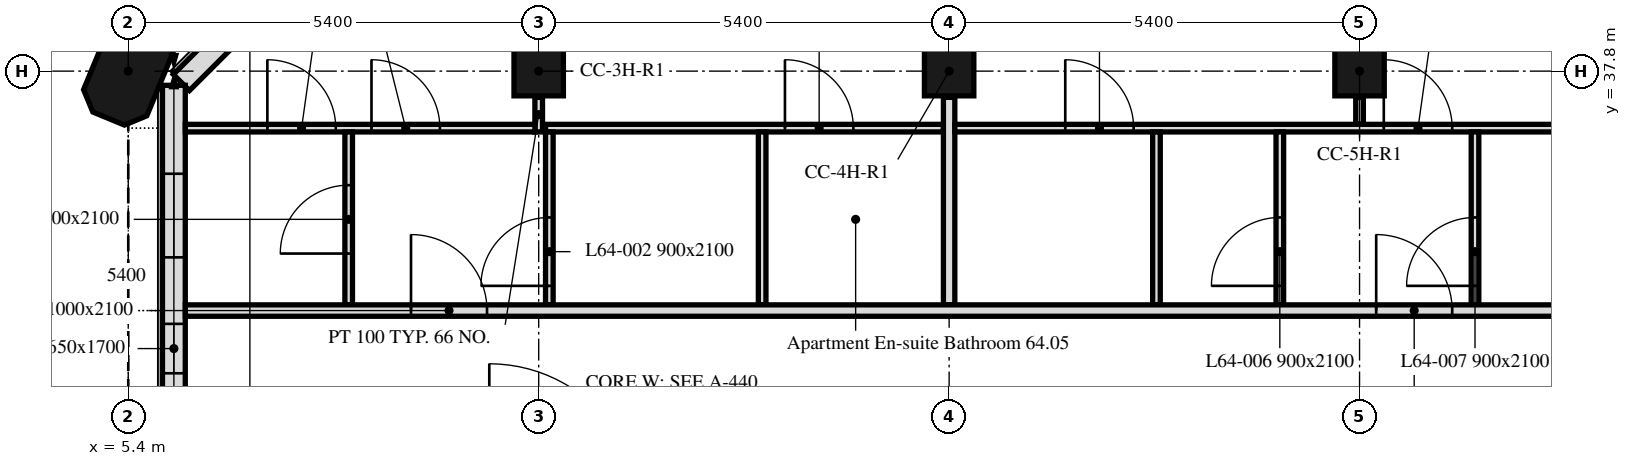
"""IFC4 building model, lengths in metres.
Left out: names, types, materials, properties, quantities, classifications, styles, units other than length and angle.
Written with IfcOpenShell. Run it as: python <this file> out.ifc"""

import sys

from ifc_helpers import new_model, si_unit, direction, frame, frame_2d, origin, origin_2d, place, context, subcontext, project, spatial, polyline, rectangle, outline, extrude, element, fill, save


model = new_model("IFC4")
c1 = context("Model", 3, precision=1e-05, world=origin(), true_north=direction((0.0, 1.0)))
c2 = subcontext(c1, "Body", "Model", "MODEL_VIEW")
j1 = project(units=[si_unit("LENGTHUNIT", "METRE"), si_unit("PLANEANGLEUNIT", "RADIAN")], contexts=[c1])
p1 = place(None, origin())
s1 = spatial("IfcSite", under=j1, at=p1, CompositionType="ELEMENT")
p2 = place(p1, origin())
s2 = spatial("IfcBuilding", under=s1, at=p2, CompositionType="ELEMENT")
p3 = place(p2, frame((0.0, 0.0, 265.3)))
s3 = spatial("IfcBuildingStorey", under=s2, at=p3, CompositionType="ELEMENT", Elevation=265.3)
p4 = place(p3, frame((5.4, 37.8, 0.0), z_axis=(0.0, 0.0, 1.0), x_axis=(0.382683432365, 0.923879532511, 0.0)))
e1 = element("IfcColumn", 1, at=p4, inside=s3, PredefinedType="COLUMN", context=c2, shape_type="SweptSolid", body=[
    extrude(outline(polyline([(-0.45, -0.45), (0.45, -0.45), (0.675, -0.225), (0.675, 0.225), (0.45, 0.45), (-0.45, 0.45), (-0.675, 0.225), (-0.675, -0.225), (-0.45, -0.45)])), origin(), (0.0, 0.0, 1.0), 3.0),
])
for number, where, z_axis, x_axis in (
    (2, (10.8, 37.8, 0.0), (0.0, 0.0, 1.0), (1.0, 0.0, 0.0)),
    (3, (16.2, 37.8, 0.0), (0.0, 0.0, 1.0), (1.0, 0.0, 0.0)),
    (4, (21.6, 37.8, 0.0), (0.0, 0.0, 1.0), (1.0, 0.0, 0.0)),
):
    element("IfcColumn", number, at=place(p3, frame(where, z_axis=z_axis, x_axis=x_axis)), inside=s3, PredefinedType="COLUMN", context=c2, shape_type="SweptSolid", body=[
        extrude(rectangle(XDim=0.65, YDim=0.65, at=origin_2d()), origin(), (0.0, 0.0, 1.0), 3.0),
    ])
p5 = place(p3, frame((10.949, 42.501, 0.0), z_axis=(0.0, 0.0, 1.0), x_axis=(-0.707106781187, -0.707106781187, 0.0)))
e5 = element("IfcWall", 5, at=p5, inside=s3, PredefinedType="SOLIDWALL", context=c2, shape_type="SweptSolid", body=[
    extrude(rectangle(XDim=6.86, YDim=0.3, at=frame_2d((3.43, 0.0))), origin(), (0.0, 0.0, 1.0), 3.0),
])
p6 = place(p5, frame((2.53, 0.0, 0.0)))
e6 = element("IfcOpeningElement", 6, at=p6, cuts=e5, PredefinedType="OPENING", context=c2, shape_type="SweptSolid", body=[
    extrude(rectangle(XDim=1.8, YDim=2.4, at=frame_2d((0.9, 1.2))), frame((0.0, 0.16, 0.0), z_axis=(0.0, -1.0, 0.0), x_axis=(1.0, 0.0, 0.0)), (0.0, 0.0, 1.0), 0.32),
])
p7 = place(p3, frame((6.0, 37.614, 0.0), z_axis=(0.0, 0.0, 1.0), x_axis=(0.0, -1.0, 0.0)))
e7 = element("IfcWall", 7, at=p7, inside=s3, PredefinedType="SOLIDWALL", context=c2, shape_type="SweptSolid", body=[
    extrude(rectangle(XDim=5.214, YDim=0.3, at=frame_2d((2.607, 0.0))), origin(), (0.0, 0.0, 1.0), 3.0),
])
p8 = place(p7, frame((1.164, 0.0, 0.9)))
e8 = element("IfcOpeningElement", 8, at=p8, cuts=e7, PredefinedType="OPENING", context=c2, shape_type="SweptSolid", body=[
    extrude(rectangle(XDim=1.1, YDim=1.7, at=frame_2d((0.55, 0.85))), frame((0.0, 0.16, 0.0), z_axis=(0.0, -1.0, 0.0), x_axis=(1.0, 0.0, 0.0)), (0.0, 0.0, 1.0), 0.32),
])
p9 = place(p7, frame((3.139, 0.0, 0.9)))
e9 = element("IfcOpeningElement", 9, at=p9, cuts=e7, PredefinedType="OPENING", context=c2, shape_type="SweptSolid", body=[
    extrude(rectangle(XDim=0.65, YDim=1.7, at=frame_2d((0.325, 0.85))), frame((0.0, 0.16, 0.0), z_axis=(0.0, -1.0, 0.0), x_axis=(1.0, 0.0, 0.0)), (0.0, 0.0, 1.0), 0.32),
])
p10 = place(p3, frame((10.8, 37.0, 0.0), z_axis=(0.0, 0.0, 1.0), x_axis=(0.0, 1.0, 0.0)))
e10 = element("IfcWall", 10, at=p10, inside=s3, PredefinedType="PARTITIONING", context=c2, shape_type="SweptSolid", body=[
    extrude(rectangle(XDim=0.455, YDim=0.1, at=frame_2d((0.228, 0.0))), origin(), (0.0, 0.0, 1.0), 3.0),
])
p11 = place(p3, frame((6.151, 37.05, 0.0), z_axis=(0.0, 0.0, 1.0), x_axis=(1.0, 0.0, 0.0)))
e11 = element("IfcWall", 11, at=p11, inside=s3, PredefinedType="PARTITIONING", context=c2, shape_type="SweptSolid", body=[
    extrude(rectangle(XDim=4.599, YDim=0.1, at=frame_2d((2.3, 0.0))), origin(), (0.0, 0.0, 1.0), 3.0),
])
p12 = place(p11, frame((1.079, 0.0, 0.0)))
e12 = element("IfcOpeningElement", 12, at=p12, cuts=e11, PredefinedType="OPENING", context=c2, shape_type="SweptSolid", body=[
    extrude(rectangle(XDim=0.9, YDim=2.1, at=frame_2d((0.45, 1.05))), frame((0.0, 0.05, 0.0), z_axis=(0.0, -1.0, 0.0), x_axis=(1.0, 0.0, 0.0)), (0.0, 0.0, 1.0), 0.1),
])
p13 = place(p11, frame((2.449, 0.0, 0.0)))
e13 = element("IfcOpeningElement", 13, at=p13, cuts=e11, PredefinedType="OPENING", context=c2, shape_type="SweptSolid", body=[
    extrude(rectangle(XDim=0.9, YDim=2.1, at=frame_2d((0.45, 1.05))), frame((0.0, 0.05, 0.0), z_axis=(0.0, -1.0, 0.0), x_axis=(1.0, 0.0, 0.0)), (0.0, 0.0, 1.0), 0.1),
])
p14 = place(p3, frame((10.89, 37.05, 0.0), z_axis=(0.0, 0.0, 1.0), x_axis=(1.0, 0.0, 0.0)))
e14 = element("IfcWall", 14, at=p14, inside=s3, PredefinedType="PARTITIONING", context=c2, shape_type="SweptSolid", body=[
    extrude(rectangle(XDim=5.235, YDim=0.1, at=frame_2d((2.618, 0.0))), origin(), (0.0, 0.0, 1.0), 3.0),
])
p15 = place(p14, frame((3.15, 0.0, 0.0)))
e15 = element("IfcOpeningElement", 15, at=p15, cuts=e14, PredefinedType="OPENING", context=c2, shape_type="SweptSolid", body=[
    extrude(rectangle(XDim=0.9, YDim=2.1, at=frame_2d((0.45, 1.05))), frame((0.0, 0.05, 0.0), z_axis=(0.0, -1.0, 0.0), x_axis=(1.0, 0.0, 0.0)), (0.0, 0.0, 1.0), 0.1),
])
p16 = place(p3, frame((8.3, 34.725, 0.0), z_axis=(0.0, 0.0, 1.0), x_axis=(0.0, 1.0, 0.0)))
e16 = element("IfcWall", 16, at=p16, inside=s3, PredefinedType="PARTITIONING", context=c2, shape_type="SweptSolid", body=[
    extrude(rectangle(XDim=2.275, YDim=0.1, at=frame_2d((1.137, 0.0))), origin(), (0.0, 0.0, 1.0), 3.0),
])
p17 = place(p16, frame((0.675, 0.0, 0.0)))
e17 = element("IfcOpeningElement", 17, at=p17, cuts=e16, PredefinedType="OPENING", context=c2, shape_type="SweptSolid", body=[
    extrude(rectangle(XDim=0.9, YDim=2.1, at=frame_2d((0.45, 1.05))), frame((0.0, 0.05, 0.0), z_axis=(0.0, -1.0, 0.0), x_axis=(1.0, 0.0, 0.0)), (0.0, 0.0, 1.0), 0.1),
])
p18 = place(p3, frame((10.94, 34.725, 0.0), z_axis=(0.0, 0.0, 1.0), x_axis=(0.0, 1.0, 0.0)))
e18 = element("IfcWall", 18, at=p18, inside=s3, PredefinedType="PARTITIONING", context=c2, shape_type="SweptSolid", body=[
    extrude(rectangle(XDim=2.275, YDim=0.1, at=frame_2d((1.137, 0.0))), origin(), (0.0, 0.0, 1.0), 3.0),
])
p19 = place(p18, frame((0.25, 0.0, 0.0)))
e19 = element("IfcOpeningElement", 19, at=p19, cuts=e18, PredefinedType="OPENING", context=c2, shape_type="SweptSolid", body=[
    extrude(rectangle(XDim=0.9, YDim=2.1, at=frame_2d((0.45, 1.05))), frame((0.0, 0.05, 0.0), z_axis=(0.0, -1.0, 0.0), x_axis=(1.0, 0.0, 0.0)), (0.0, 0.0, 1.0), 0.1),
])
p20 = place(p3, frame((13.74, 34.725, 0.0), z_axis=(0.0, 0.0, 1.0), x_axis=(0.0, 1.0, 0.0)))
e20 = element("IfcWall", 20, at=p20, inside=s3, PredefinedType="PARTITIONING", context=c2, shape_type="SweptSolid", body=[
    extrude(rectangle(XDim=2.275, YDim=0.1, at=frame_2d((1.137, 0.0))), origin(), (0.0, 0.0, 1.0), 3.0),
])
p21 = place(p3, frame((16.2, 34.725, 0.0), z_axis=(0.0, 0.0, 1.0), x_axis=(0.0, 1.0, 0.0)))
e21 = element("IfcWall", 21, at=p21, inside=s3, PredefinedType="PARTITIONING", context=c2, shape_type="SweptSolid", body=[
    extrude(rectangle(XDim=2.73, YDim=0.15, at=frame_2d((1.365, 0.0))), origin(), (0.0, 0.0, 1.0), 3.0),
])
p22 = place(p3, frame((21.6, 37.1, 0.0), z_axis=(0.0, 0.0, 1.0), x_axis=(0.0, 1.0, 0.0)))
e22 = element("IfcWall", 22, at=p22, inside=s3, PredefinedType="PARTITIONING", context=c2, shape_type="SweptSolid", body=[
    extrude(rectangle(XDim=0.355, YDim=0.1, at=frame_2d((0.177, 0.0))), origin(), (0.0, 0.0, 1.0), 3.0),
])
p23 = place(p3, frame((16.275, 37.05, 0.0), z_axis=(0.0, 0.0, 1.0), x_axis=(1.0, 0.0, 0.0)))
e23 = element("IfcWall", 23, at=p23, inside=s3, PredefinedType="PARTITIONING", context=c2, shape_type="SweptSolid", body=[
    extrude(rectangle(XDim=16.05, YDim=0.1, at=frame_2d((8.025, 0.0))), origin(), (0.0, 0.0, 1.0), 3.0),
])
p24 = place(p23, frame((1.453, 0.0, 0.0)))
e24 = element("IfcOpeningElement", 24, at=p24, cuts=e23, PredefinedType="OPENING", context=c2, shape_type="SweptSolid", body=[
    extrude(rectangle(XDim=0.9, YDim=2.1, at=frame_2d((0.45, 1.05))), frame((0.0, 0.05, 0.0), z_axis=(0.0, -1.0, 0.0), x_axis=(1.0, 0.0, 0.0)), (0.0, 0.0, 1.0), 0.1),
])
p25 = place(p23, frame((12.125, 0.0, 0.0)))
e25 = element("IfcOpeningElement", 25, at=p25, cuts=e23, PredefinedType="OPENING", context=c2, shape_type="SweptSolid", body=[
    extrude(rectangle(XDim=0.9, YDim=2.1, at=frame_2d((0.45, 1.05))), frame((0.0, 0.05, 0.0), z_axis=(0.0, -1.0, 0.0), x_axis=(1.0, 0.0, 0.0)), (0.0, 0.0, 1.0), 0.1),
])
p26 = place(p23, frame((13.625, 0.0, 0.0)))
e26 = element("IfcOpeningElement", 26, at=p26, cuts=e23, PredefinedType="OPENING", context=c2, shape_type="SweptSolid", body=[
    extrude(rectangle(XDim=0.9, YDim=2.1, at=frame_2d((0.45, 1.05))), frame((0.0, 0.05, 0.0), z_axis=(0.0, -1.0, 0.0), x_axis=(1.0, 0.0, 0.0)), (0.0, 0.0, 1.0), 0.1),
])
p27 = place(p23, frame((5.644, 0.0, 0.0)))
e27 = element("IfcOpeningElement", 27, at=p27, cuts=e23, PredefinedType="OPENING", context=c2, shape_type="SweptSolid", body=[
    extrude(rectangle(XDim=0.9, YDim=2.1, at=frame_2d((0.45, 1.05))), frame((0.0, 0.05, 0.0), z_axis=(0.0, -1.0, 0.0), x_axis=(1.0, 0.0, 0.0)), (0.0, 0.0, 1.0), 0.1),
])
p28 = place(p3, frame((18.928, 34.725, 0.0), z_axis=(0.0, 0.0, 1.0), x_axis=(0.0, 1.0, 0.0)))
e28 = element("IfcWall", 28, at=p28, inside=s3, PredefinedType="PARTITIONING", context=c2, shape_type="SweptSolid", body=[
    extrude(rectangle(XDim=2.275, YDim=0.1, at=frame_2d((1.137, 0.0))), origin(), (0.0, 0.0, 1.0), 3.0),
])
p29 = place(p3, frame((20.551, 34.725, 0.0), z_axis=(0.0, 0.0, 1.0), x_axis=(0.0, 1.0, 0.0)))
e29 = element("IfcWall", 29, at=p29, inside=s3, PredefinedType="PARTITIONING", context=c2, shape_type="SweptSolid", body=[
    extrude(rectangle(XDim=2.275, YDim=0.1, at=frame_2d((1.137, 0.0))), origin(), (0.0, 0.0, 1.0), 3.0),
])
p30 = place(p29, frame((0.25, 0.0, 0.0)))
e30 = element("IfcOpeningElement", 30, at=p30, cuts=e29, PredefinedType="OPENING", context=c2, shape_type="SweptSolid", body=[
    extrude(rectangle(XDim=0.9, YDim=2.1, at=frame_2d((0.45, 1.05))), frame((0.0, 0.05, 0.0), z_axis=(0.0, -1.0, 0.0), x_axis=(1.0, 0.0, 0.0)), (0.0, 0.0, 1.0), 0.1),
])
p31 = place(p3, frame((23.119, 34.725, 0.0), z_axis=(0.0, 0.0, 1.0), x_axis=(0.0, 1.0, 0.0)))
e31 = element("IfcWall", 31, at=p31, inside=s3, PredefinedType="PARTITIONING", context=c2, shape_type="SweptSolid", body=[
    extrude(rectangle(XDim=2.275, YDim=0.1, at=frame_2d((1.137, 0.0))), origin(), (0.0, 0.0, 1.0), 3.0),
])
p32 = place(p31, frame((0.25, 0.0, 0.0)))
e32 = element("IfcOpeningElement", 32, at=p32, cuts=e31, PredefinedType="OPENING", context=c2, shape_type="SweptSolid", body=[
    extrude(rectangle(XDim=0.9, YDim=2.1, at=frame_2d((0.45, 1.05))), frame((0.0, 0.05, 0.0), z_axis=(0.0, -1.0, 0.0), x_axis=(1.0, 0.0, 0.0)), (0.0, 0.0, 1.0), 0.1),
])
p33 = place(p3, frame((6.151, 34.65, 0.0), z_axis=(0.0, 0.0, 1.0), x_axis=(1.0, 0.0, 0.0)))
e33 = element("IfcWall", 33, at=p33, inside=s3, PredefinedType="PARTITIONING", context=c2, shape_type="SweptSolid", body=[
    extrude(rectangle(XDim=41.698, YDim=0.15, at=frame_2d((20.849, 0.0))), origin(), (0.0, 0.0, 1.0), 3.0),
])
p34 = place(p33, frame((2.969, 0.0, 0.0)))
e34 = element("IfcOpeningElement", 34, at=p34, cuts=e33, PredefinedType="OPENING", context=c2, shape_type="SweptSolid", body=[
    extrude(rectangle(XDim=1.0, YDim=2.1, at=frame_2d((0.5, 1.05))), frame((0.0, 0.075, 0.0), z_axis=(0.0, -1.0, 0.0), x_axis=(1.0, 0.0, 0.0)), (0.0, 0.0, 1.0), 0.15),
])
p35 = place(p33, frame((15.668, 0.0, 0.0)))
e35 = element("IfcOpeningElement", 35, at=p35, cuts=e33, PredefinedType="OPENING", context=c2, shape_type="SweptSolid", body=[
    extrude(rectangle(XDim=1.0, YDim=2.1, at=frame_2d((0.5, 1.05))), frame((0.0, 0.075, 0.0), z_axis=(0.0, -1.0, 0.0), x_axis=(1.0, 0.0, 0.0)), (0.0, 0.0, 1.0), 0.15),
])
p36 = place(p33, frame((32.054, 0.0, 0.0)))
e36 = element("IfcOpeningElement", 36, at=p36, cuts=e33, PredefinedType="OPENING", context=c2, shape_type="SweptSolid", body=[
    extrude(rectangle(XDim=1.0, YDim=2.1, at=frame_2d((0.5, 1.05))), frame((0.0, 0.075, 0.0), z_axis=(0.0, -1.0, 0.0), x_axis=(1.0, 0.0, 0.0)), (0.0, 0.0, 1.0), 0.15),
])
p37 = place(p8, origin())
e37 = element("IfcWindow", 37, at=p37, inside=s3, PartitioningType="SINGLE_PANEL", PredefinedType="WINDOW", context=c2, shape_type="SweptSolid", body=[
    extrude(rectangle(XDim=1.1, YDim=1.7, at=frame_2d((0.55, 0.85))), frame((0.0, 0.03, 0.0), z_axis=(0.0, -1.0, 0.0), x_axis=(1.0, 0.0, 0.0)), (0.0, 0.0, 1.0), 0.06),
])
fill(e8, e37)
p38 = place(p9, origin())
e38 = element("IfcWindow", 38, at=p38, inside=s3, PartitioningType="SINGLE_PANEL", PredefinedType="WINDOW", context=c2, shape_type="SweptSolid", body=[
    extrude(rectangle(XDim=0.65, YDim=1.7, at=frame_2d((0.325, 0.85))), frame((0.0, 0.03, 0.0), z_axis=(0.0, -1.0, 0.0), x_axis=(1.0, 0.0, 0.0)), (0.0, 0.0, 1.0), 0.06),
])
fill(e9, e38)
p39 = place(p15, origin())
e39 = element("IfcDoor", 39, at=p39, inside=s3, OperationType="SINGLE_SWING_LEFT", PredefinedType="DOOR", context=c2, shape_type="SweptSolid", body=[
    extrude(rectangle(XDim=0.9, YDim=2.1, at=frame_2d((0.45, 1.05))), frame((0.0, 0.025, 0.0), z_axis=(0.0, -1.0, 0.0), x_axis=(1.0, 0.0, 0.0)), (0.0, 0.0, 1.0), 0.05),
])
fill(e15, e39)
p40 = place(p19, origin())
e40 = element("IfcDoor", 40, at=p40, inside=s3, OperationType="SINGLE_SWING_LEFT", PredefinedType="DOOR", context=c2, shape_type="SweptSolid", body=[
    extrude(rectangle(XDim=0.9, YDim=2.1, at=frame_2d((0.45, 1.05))), frame((0.0, 0.025, 0.0), z_axis=(0.0, -1.0, 0.0), x_axis=(1.0, 0.0, 0.0)), (0.0, 0.0, 1.0), 0.05),
])
fill(e19, e40)
p41 = place(p24, origin())
e41 = element("IfcDoor", 41, at=p41, inside=s3, OperationType="SINGLE_SWING_RIGHT", PredefinedType="DOOR", context=c2, shape_type="SweptSolid", body=[
    extrude(rectangle(XDim=0.9, YDim=2.1, at=frame_2d((0.45, 1.05))), frame((0.0, 0.025, 0.0), z_axis=(0.0, -1.0, 0.0), x_axis=(1.0, 0.0, 0.0)), (0.0, 0.0, 1.0), 0.05),
])
fill(e24, e41)
p42 = place(p30, origin())
e42 = element("IfcDoor", 42, at=p42, inside=s3, OperationType="SINGLE_SWING_RIGHT", PredefinedType="DOOR", context=c2, shape_type="SweptSolid", body=[
    extrude(rectangle(XDim=0.9, YDim=2.1, at=frame_2d((0.45, 1.05))), frame((0.0, 0.025, 0.0), z_axis=(0.0, -1.0, 0.0), x_axis=(1.0, 0.0, 0.0)), (0.0, 0.0, 1.0), 0.05),
])
fill(e30, e42)
p43 = place(p32, origin())
e43 = element("IfcDoor", 43, at=p43, inside=s3, OperationType="SINGLE_SWING_LEFT", PredefinedType="DOOR", context=c2, shape_type="SweptSolid", body=[
    extrude(rectangle(XDim=0.9, YDim=2.1, at=frame_2d((0.45, 1.05))), frame((0.0, 0.025, 0.0), z_axis=(0.0, -1.0, 0.0), x_axis=(1.0, 0.0, 0.0)), (0.0, 0.0, 1.0), 0.05),
])
fill(e32, e43)
p44 = place(p12, origin())
e44 = element("IfcDoor", 44, at=p44, inside=s3, OperationType="SINGLE_SWING_RIGHT", PredefinedType="DOOR", context=c2, shape_type="SweptSolid", body=[
    extrude(rectangle(XDim=0.9, YDim=2.1, at=frame_2d((0.45, 1.05))), frame((0.0, 0.025, 0.0), z_axis=(0.0, -1.0, 0.0), x_axis=(1.0, 0.0, 0.0)), (0.0, 0.0, 1.0), 0.05),
])
fill(e12, e44)
p45 = place(p17, origin())
e45 = element("IfcDoor", 45, at=p45, inside=s3, OperationType="SINGLE_SWING_LEFT", PredefinedType="DOOR", context=c2, shape_type="SweptSolid", body=[
    extrude(rectangle(XDim=0.9, YDim=2.1, at=frame_2d((0.45, 1.05))), frame((0.0, 0.025, 0.0), z_axis=(0.0, -1.0, 0.0), x_axis=(1.0, 0.0, 0.0)), (0.0, 0.0, 1.0), 0.05),
])
fill(e17, e45)
p46 = place(p27, origin())
e46 = element("IfcDoor", 46, at=p46, inside=s3, OperationType="SINGLE_SWING_RIGHT", PredefinedType="DOOR", context=c2, shape_type="SweptSolid", body=[
    extrude(rectangle(XDim=0.9, YDim=2.1, at=frame_2d((0.45, 1.05))), frame((0.0, 0.025, 0.0), z_axis=(0.0, -1.0, 0.0), x_axis=(1.0, 0.0, 0.0)), (0.0, 0.0, 1.0), 0.05),
])
fill(e27, e46)
p47 = place(p13, origin())
e47 = element("IfcDoor", 47, at=p47, inside=s3, OperationType="SINGLE_SWING_LEFT", PredefinedType="DOOR", context=c2, shape_type="SweptSolid", body=[
    extrude(rectangle(XDim=0.9, YDim=2.1, at=frame_2d((0.45, 1.05))), frame((0.0, 0.025, 0.0), z_axis=(0.0, -1.0, 0.0), x_axis=(1.0, 0.0, 0.0)), (0.0, 0.0, 1.0), 0.05),
])
fill(e13, e47)
p48 = place(p34, origin())
e48 = element("IfcDoor", 48, at=p48, inside=s3, OperationType="SINGLE_SWING_RIGHT", PredefinedType="DOOR", context=c2, shape_type="SweptSolid", body=[
    extrude(rectangle(XDim=1.0, YDim=2.1, at=frame_2d((0.5, 1.05))), frame((0.0, 0.025, 0.0), z_axis=(0.0, -1.0, 0.0), x_axis=(1.0, 0.0, 0.0)), (0.0, 0.0, 1.0), 0.05),
])
fill(e34, e48)
p49 = place(p35, origin())
e49 = element("IfcDoor", 49, at=p49, inside=s3, OperationType="SINGLE_SWING_LEFT", PredefinedType="DOOR", context=c2, shape_type="SweptSolid", body=[
    extrude(rectangle(XDim=1.0, YDim=2.1, at=frame_2d((0.5, 1.05))), frame((0.0, 0.025, 0.0), z_axis=(0.0, -1.0, 0.0), x_axis=(1.0, 0.0, 0.0)), (0.0, 0.0, 1.0), 0.05),
])
fill(e35, e49)
save(model, sys.argv[1])
